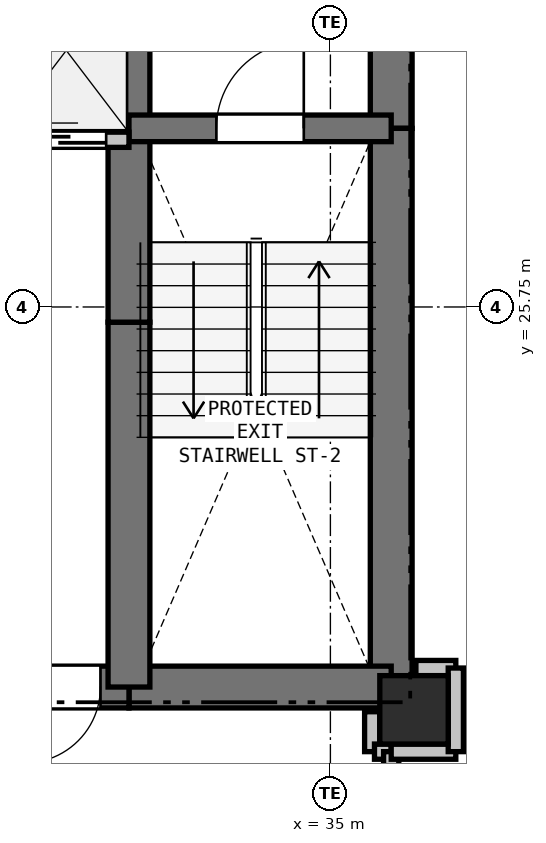
"""IFC4 building model, lengths in metres.
Left out: names, types, materials, properties, quantities, classifications, styles, units other than length and angle.
Written with IfcOpenShell. Run it as: python <this file> out.ifc"""

import sys

from ifc_helpers import new_model, si_unit, direction, frame, frame_2d, origin, origin_2d, place, context, subcontext, project, spatial, rectangle, extrude, element, fill, save


model = new_model("IFC4")
c1 = context("Model", 3, precision=1e-05, world=origin(), true_north=direction((0.0, 1.0)))
c2 = subcontext(c1, "Body", "Model", "MODEL_VIEW")
j1 = project(units=[si_unit("LENGTHUNIT", "METRE"), si_unit("PLANEANGLEUNIT", "RADIAN")], contexts=[c1])
p1 = place(None, origin())
s1 = spatial("IfcSite", under=j1, at=p1, CompositionType="ELEMENT")
p2 = place(p1, origin())
s2 = spatial("IfcBuilding", under=s1, at=p2, CompositionType="ELEMENT")
p3 = place(p2, frame((0.0, 0.0, 39.0)))
s3 = spatial("IfcBuildingStorey", under=s2, at=p3, CompositionType="ELEMENT", Elevation=39.0)
p4 = place(p3, frame((36.1, 20.45, 0.0), z_axis=(0.0, 0.0, 1.0), x_axis=(1.0, 0.0, 0.0)))
e1 = element("IfcColumn", 1, at=p4, inside=s3, PredefinedType="COLUMN", context=c2, shape_type="SweptSolid", body=[
    extrude(rectangle(XDim=0.9, YDim=0.9, at=origin_2d()), origin(), (0.0, 0.0, 1.0), 3.3),
])
p5 = place(p3, frame((35.8, 32.75, 0.0), z_axis=(0.0, 0.0, 1.0), x_axis=(0.0, -1.0, 0.0)))
e2 = element("IfcWall", 2, at=p5, inside=s3, PredefinedType="SHEAR", context=c2, shape_type="SweptSolid", body=[
    extrude(rectangle(XDim=4.65, YDim=0.55, at=frame_2d((2.325, 0.0))), origin(), (0.0, 0.0, 1.0), 3.04),
])
p6 = place(p3, frame((35.8, 28.1, 0.0), z_axis=(0.0, 0.0, 1.0), x_axis=(0.0, -1.0, 0.0)))
e3 = element("IfcWall", 3, at=p6, inside=s3, PredefinedType="SHEAR", context=c2, shape_type="SweptSolid", body=[
    extrude(rectangle(XDim=7.35, YDim=0.55, at=frame_2d((3.675, 0.0))), origin(), (0.0, 0.0, 1.0), 3.04),
])
p7 = place(p3, frame((35.8, 20.75, 0.0), z_axis=(0.0, 0.0, 1.0), x_axis=(-1.0, 0.0, 0.0)))
e4 = element("IfcWall", 4, at=p7, inside=s3, PredefinedType="SHEAR", context=c2, shape_type="SweptSolid", body=[
    extrude(rectangle(XDim=3.45, YDim=0.55, at=frame_2d((1.725, 0.0))), origin(), (0.0, 0.0, 1.0), 3.04),
])
p8 = place(p3, frame((32.35, 20.75, 0.0), z_axis=(0.0, 0.0, 1.0), x_axis=(-1.0, 0.0, 0.0)))
e5 = element("IfcWall", 5, at=p8, inside=s3, PredefinedType="SHEAR", context=c2, shape_type="SweptSolid", body=[
    extrude(rectangle(XDim=1.75, YDim=0.55, at=frame_2d((0.875, 0.0))), origin(), (0.0, 0.0, 1.0), 3.04),
])
p9 = place(p8, frame((0.375, 0.0, 0.0)))
e6 = element("IfcOpeningElement", 6, at=p9, cuts=e5, PredefinedType="OPENING", context=c2, shape_type="SweptSolid", body=[
    extrude(rectangle(XDim=1.0, YDim=2.15, at=frame_2d((0.5, 1.075))), frame((0.0, 0.285, 0.0), z_axis=(0.0, -1.0, 0.0), x_axis=(1.0, 0.0, 0.0)), (0.0, 0.0, 1.0), 0.57),
])
p10 = place(p3, frame((32.35, 20.75, 0.0), z_axis=(0.0, 0.0, 1.0), x_axis=(0.0, 1.0, 0.0)))
e7 = element("IfcWall", 7, at=p10, inside=s3, PredefinedType="SHEAR", context=c2, shape_type="SweptSolid", body=[
    extrude(rectangle(XDim=4.8, YDim=0.55, at=frame_2d((2.4, 0.0))), origin(), (0.0, 0.0, 1.0), 3.04),
])
p11 = place(p3, frame((32.35, 25.55, 0.0), z_axis=(0.0, 0.0, 1.0), x_axis=(0.0, 1.0, 0.0)))
e8 = element("IfcWall", 8, at=p11, inside=s3, PredefinedType="SHEAR", context=c2, shape_type="SweptSolid", body=[
    extrude(rectangle(XDim=2.4, YDim=0.55, at=frame_2d((1.2, 0.0))), origin(), (0.0, 0.0, 1.0), 3.04),
])
p12 = place(p3, frame((32.35, 27.95, 0.0), z_axis=(0.0, 0.0, 1.0), x_axis=(0.0, 1.0, 0.0)))
e9 = element("IfcWall", 9, at=p12, inside=s3, PredefinedType="SHEAR", context=c2, shape_type="SweptSolid", body=[
    extrude(rectangle(XDim=2.8, YDim=0.55, at=frame_2d((1.4, 0.0))), origin(), (0.0, 0.0, 1.0), 3.04),
])
p13 = place(p3, frame((32.35, 28.1, 0.0), z_axis=(0.0, 0.0, 1.0), x_axis=(1.0, 0.0, 0.0)))
e10 = element("IfcWall", 10, at=p13, inside=s3, PredefinedType="SHEAR", context=c2, shape_type="SweptSolid", body=[
    extrude(rectangle(XDim=3.45, YDim=0.35, at=frame_2d((1.725, 0.0))), origin(), (0.0, 0.0, 1.0), 3.04),
])
p14 = place(p13, frame((1.15, 0.0, 0.0)))
e11 = element("IfcOpeningElement", 11, at=p14, cuts=e10, PredefinedType="OPENING", context=c2, shape_type="SweptSolid", body=[
    extrude(rectangle(XDim=1.15, YDim=2.15, at=frame_2d((0.575, 1.075))), frame((0.0, 0.185, 0.0), z_axis=(0.0, -1.0, 0.0), x_axis=(1.0, 0.0, 0.0)), (0.0, 0.0, 1.0), 0.37),
])
p15 = place(p3, frame((27.4, 27.95, 0.0), z_axis=(0.0, 0.0, 1.0), x_axis=(1.0, 0.0, 0.0)))
e12 = element("IfcWall", 12, at=p15, inside=s3, PredefinedType="PARTITIONING", context=c2, shape_type="SweptSolid", body=[
    extrude(rectangle(XDim=4.95, YDim=0.2, at=frame_2d((2.475, 0.0))), origin(), (0.0, 0.0, 1.0), 3.04),
])
p16 = place(p15, frame((0.25, 0.0, 0.0)))
e13 = element("IfcOpeningElement", 13, at=p16, cuts=e12, PredefinedType="OPENING", context=c2, shape_type="SweptSolid", body=[
    extrude(rectangle(XDim=1.1, YDim=2.15, at=frame_2d((0.55, 1.075))), frame((0.0, 0.11, 0.0), z_axis=(0.0, -1.0, 0.0), x_axis=(1.0, 0.0, 0.0)), (0.0, 0.0, 1.0), 0.22),
])
p17 = place(p15, frame((1.9, 0.0, 0.0)))
e14 = element("IfcOpeningElement", 14, at=p17, cuts=e12, PredefinedType="OPENING", context=c2, shape_type="SweptSolid", body=[
    extrude(rectangle(XDim=1.1, YDim=2.15, at=frame_2d((0.55, 1.075))), frame((0.0, 0.11, 0.0), z_axis=(0.0, -1.0, 0.0), x_axis=(1.0, 0.0, 0.0)), (0.0, 0.0, 1.0), 0.22),
])
p18 = place(p15, frame((3.55, 0.0, 0.0)))
e15 = element("IfcOpeningElement", 15, at=p18, cuts=e12, PredefinedType="OPENING", context=c2, shape_type="SweptSolid", body=[
    extrude(rectangle(XDim=1.1, YDim=2.15, at=frame_2d((0.55, 1.075))), frame((0.0, 0.11, 0.0), z_axis=(0.0, -1.0, 0.0), x_axis=(1.0, 0.0, 0.0)), (0.0, 0.0, 1.0), 0.22),
])
p19 = place(p3, frame((35.55, 20.425, 0.0), z_axis=(0.0, 0.0, 1.0), x_axis=(0.0, -1.0, 0.0)))
e16 = element("IfcWall", 16, at=p19, inside=s3, PredefinedType="PARTITIONING", context=c2, shape_type="SweptSolid", body=[
    extrude(rectangle(XDim=0.525, YDim=0.2, at=frame_2d((0.263, 0.0))), origin(), (0.0, 0.0, 1.0), 2.488),
])
p20 = place(p3, frame((35.58, 19.9, 0.0), z_axis=(0.0, 0.0, 1.0), x_axis=(1.0, 0.0, 0.0)))
e17 = element("IfcWall", 17, at=p20, inside=s3, PredefinedType="PARTITIONING", context=c2, shape_type="SweptSolid", body=[
    extrude(rectangle(XDim=0.22, YDim=0.2, at=frame_2d((0.11, 0.0))), origin(), (0.0, 0.0, 1.0), 3.04),
])
p21 = place(p3, frame((35.8, 19.9, 0.0), z_axis=(0.0, 0.0, 1.0), x_axis=(0.0, -1.0, 0.0)))
e18 = element("IfcWall", 18, at=p21, inside=s3, PredefinedType="PARTITIONING", context=c2, shape_type="SweptSolid", body=[
    extrude(rectangle(XDim=1.75, YDim=0.2, at=frame_2d((0.875, 0.0))), origin(), (0.0, 0.0, 1.0), 3.04),
])
p22 = place(p21, frame((0.375, 0.0, 0.0)))
e19 = element("IfcOpeningElement", 19, at=p22, cuts=e18, PredefinedType="OPENING", context=c2, shape_type="SweptSolid", body=[
    extrude(rectangle(XDim=1.0, YDim=2.15, at=frame_2d((0.5, 1.075))), frame((0.0, 0.11, 0.0), z_axis=(0.0, -1.0, 0.0), x_axis=(1.0, 0.0, 0.0)), (0.0, 0.0, 1.0), 0.22),
])
p23 = place(p3, frame((36.65, 21.0, 0.0), z_axis=(0.0, 0.0, 1.0), x_axis=(-1.0, 0.0, 0.0)))
e20 = element("IfcWall", 20, at=p23, inside=s3, PredefinedType="PARTITIONING", context=c2, shape_type="SweptSolid", body=[
    extrude(rectangle(XDim=0.525, YDim=0.2, at=frame_2d((0.262, 0.0))), origin(), (0.0, 0.0, 1.0), 2.488),
])
p24 = place(p3, frame((35.8, 19.9, 0.0), z_axis=(0.0, 0.0, 1.0), x_axis=(1.0, 0.0, 0.0)))
e21 = element("IfcWall", 21, at=p24, inside=s3, PredefinedType="PARTITIONING", context=c2, shape_type="SweptSolid", body=[
    extrude(rectangle(XDim=0.85, YDim=0.2, at=frame_2d((0.425, 0.0))), origin(), (0.0, 0.0, 1.0), 2.337),
])
p25 = place(p3, frame((36.65, 19.9, 0.0), z_axis=(0.0, 0.0, 1.0), x_axis=(0.0, 1.0, 0.0)))
e22 = element("IfcWall", 22, at=p25, inside=s3, PredefinedType="PARTITIONING", context=c2, shape_type="SweptSolid", body=[
    extrude(rectangle(XDim=1.1, YDim=0.2, at=frame_2d((0.55, 0.0))), origin(), (0.0, 0.0, 1.0), 3.04),
])
p26 = place(p18, origin())
e23 = element("IfcDoor", 23, at=p26, inside=s3, OperationType="SLIDING_TO_LEFT", PredefinedType="DOOR", context=c2, shape_type="SweptSolid", body=[
    extrude(rectangle(XDim=1.1, YDim=2.15, at=frame_2d((0.55, 1.075))), frame((0.0, 0.025, 0.0), z_axis=(0.0, -1.0, 0.0), x_axis=(1.0, 0.0, 0.0)), (0.0, 0.0, 1.0), 0.05),
])
fill(e15, e23)
p27 = place(p9, origin())
e24 = element("IfcDoor", 24, at=p27, inside=s3, OperationType="SINGLE_SWING_RIGHT", PredefinedType="DOOR", context=c2, shape_type="SweptSolid", body=[
    extrude(rectangle(XDim=1.0, YDim=2.15, at=frame_2d((0.5, 1.075))), frame((0.0, 0.025, 0.0), z_axis=(0.0, -1.0, 0.0), x_axis=(1.0, 0.0, 0.0)), (0.0, 0.0, 1.0), 0.05),
])
fill(e6, e24)
p28 = place(p14, origin())
e25 = element("IfcDoor", 25, at=p28, inside=s3, OperationType="SINGLE_SWING_RIGHT", PredefinedType="DOOR", context=c2, shape_type="SweptSolid", body=[
    extrude(rectangle(XDim=1.15, YDim=2.15, at=frame_2d((0.575, 1.075))), frame((0.0, 0.025, 0.0), z_axis=(0.0, -1.0, 0.0), x_axis=(1.0, 0.0, 0.0)), (0.0, 0.0, 1.0), 0.05),
])
fill(e11, e25)
save(model, sys.argv[1])
